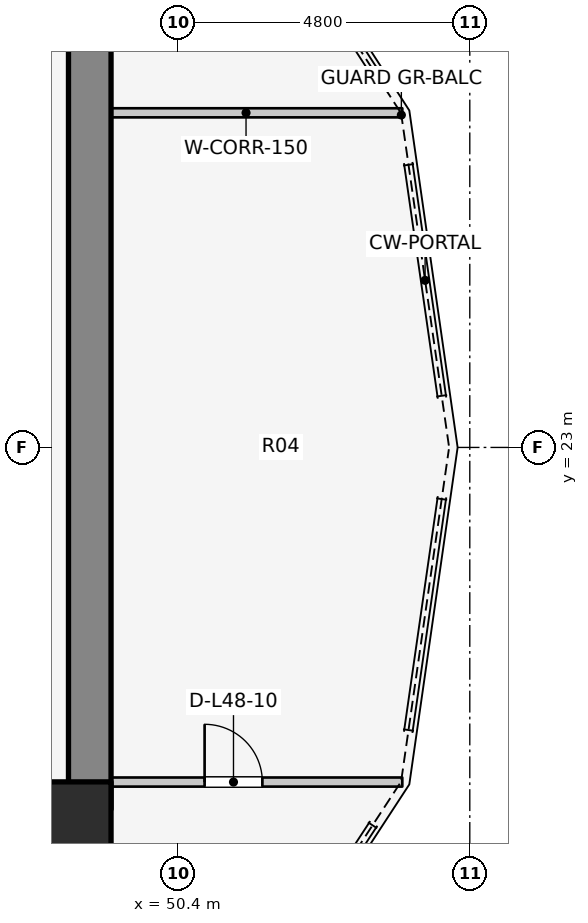
"""IFC4 building model, lengths in metres.
Left out: names, types, materials, properties, quantities, classifications, styles, units other than length and angle.
Written with IfcOpenShell. Run it as: python <this file> out.ifc"""

import sys

from ifc_helpers import new_model, si_unit, direction, frame, frame_2d, origin, origin_2d, place, context, subcontext, project, spatial, rectangle, extrude, element, fill, save


model = new_model("IFC4")
c1 = context("Model", 3, precision=1e-05, world=origin(), true_north=direction((0.0, 1.0)))
c2 = subcontext(c1, "Body", "Model", "MODEL_VIEW")
j1 = project(units=[si_unit("LENGTHUNIT", "METRE"), si_unit("PLANEANGLEUNIT", "RADIAN")], contexts=[c1])
p1 = place(None, origin())
s1 = spatial("IfcSite", under=j1, at=p1, CompositionType="ELEMENT")
p2 = place(p1, origin())
s2 = spatial("IfcBuilding", under=s1, at=p2, CompositionType="ELEMENT")
p3 = place(p2, frame((0.0, 0.0, 159.1)))
s3 = spatial("IfcBuildingStorey", under=s2, at=p3, CompositionType="ELEMENT", Elevation=159.1)
p4 = place(p3, frame((48.95, 17.05, 0.0), z_axis=(0.0, 0.0, 1.0), x_axis=(0.0, 1.0, 0.0)))
e1 = element("IfcWall", 1, at=p4, inside=s3, PredefinedType="SHEAR", context=c2, shape_type="SweptSolid", body=[
    extrude(rectangle(XDim=12.8, YDim=0.7, at=frame_2d((6.4, 0.0))), origin(), (0.0, 0.0, 1.0), 3.1),
])
p5 = place(p3, frame((48.7, 16.9, 0.0), z_axis=(0.0, 0.0, 1.0), x_axis=(1.0, 0.0, 0.0)))
e2 = element("IfcColumn", 2, at=p5, inside=s3, PredefinedType="COLUMN", context=c2, shape_type="SweptSolid", body=[
    extrude(rectangle(XDim=1.2, YDim=1.2, at=origin_2d()), origin(), (0.0, 0.0, 1.0), 3.1),
])
p6 = place(p3, frame((48.95, 17.497, 0.0), z_axis=(0.0, 0.0, 1.0), x_axis=(1.0, 0.0, 0.0)))
e3 = element("IfcWall", 3, at=p6, inside=s3, PredefinedType="PARTITIONING", context=c2, shape_type="SweptSolid", body=[
    extrude(rectangle(XDim=5.14, YDim=0.15, at=frame_2d((2.57, 0.0))), origin(), (0.0, 0.0, 1.0), 2.575),
])
p7 = place(p6, frame((1.889, 0.0, 0.0)))
e4 = element("IfcOpeningElement", 4, at=p7, cuts=e3, PredefinedType="OPENING", context=c2, shape_type="SweptSolid", body=[
    extrude(rectangle(XDim=0.95, YDim=2.1, at=frame_2d((0.475, 1.05))), frame((0.0, 0.085, 0.0), z_axis=(0.0, -1.0, 0.0), x_axis=(1.0, 0.0, 0.0)), (0.0, 0.0, 1.0), 0.17),
])
p8 = place(p3, frame((48.95, 28.503, 0.0), z_axis=(0.0, 0.0, 1.0), x_axis=(1.0, 0.0, 0.0)))
e5 = element("IfcWall", 5, at=p8, inside=s3, PredefinedType="PARTITIONING", context=c2, shape_type="SweptSolid", body=[
    extrude(rectangle(XDim=5.14, YDim=0.15, at=frame_2d((2.57, 0.0))), origin(), (0.0, 0.0, 1.0), 2.575),
])
p9 = place(p7, origin())
e6 = element("IfcDoor", 6, at=p9, inside=s3, OperationType="SINGLE_SWING_LEFT", PredefinedType="DOOR", context=c2, shape_type="SweptSolid", body=[
    extrude(rectangle(XDim=0.95, YDim=2.1, at=frame_2d((0.475, 1.05))), frame((0.0, 0.025, 0.0), z_axis=(0.0, -1.0, 0.0), x_axis=(1.0, 0.0, 0.0)), (0.0, 0.0, 1.0), 0.05),
])
fill(e4, e6)
save(model, sys.argv[1])
